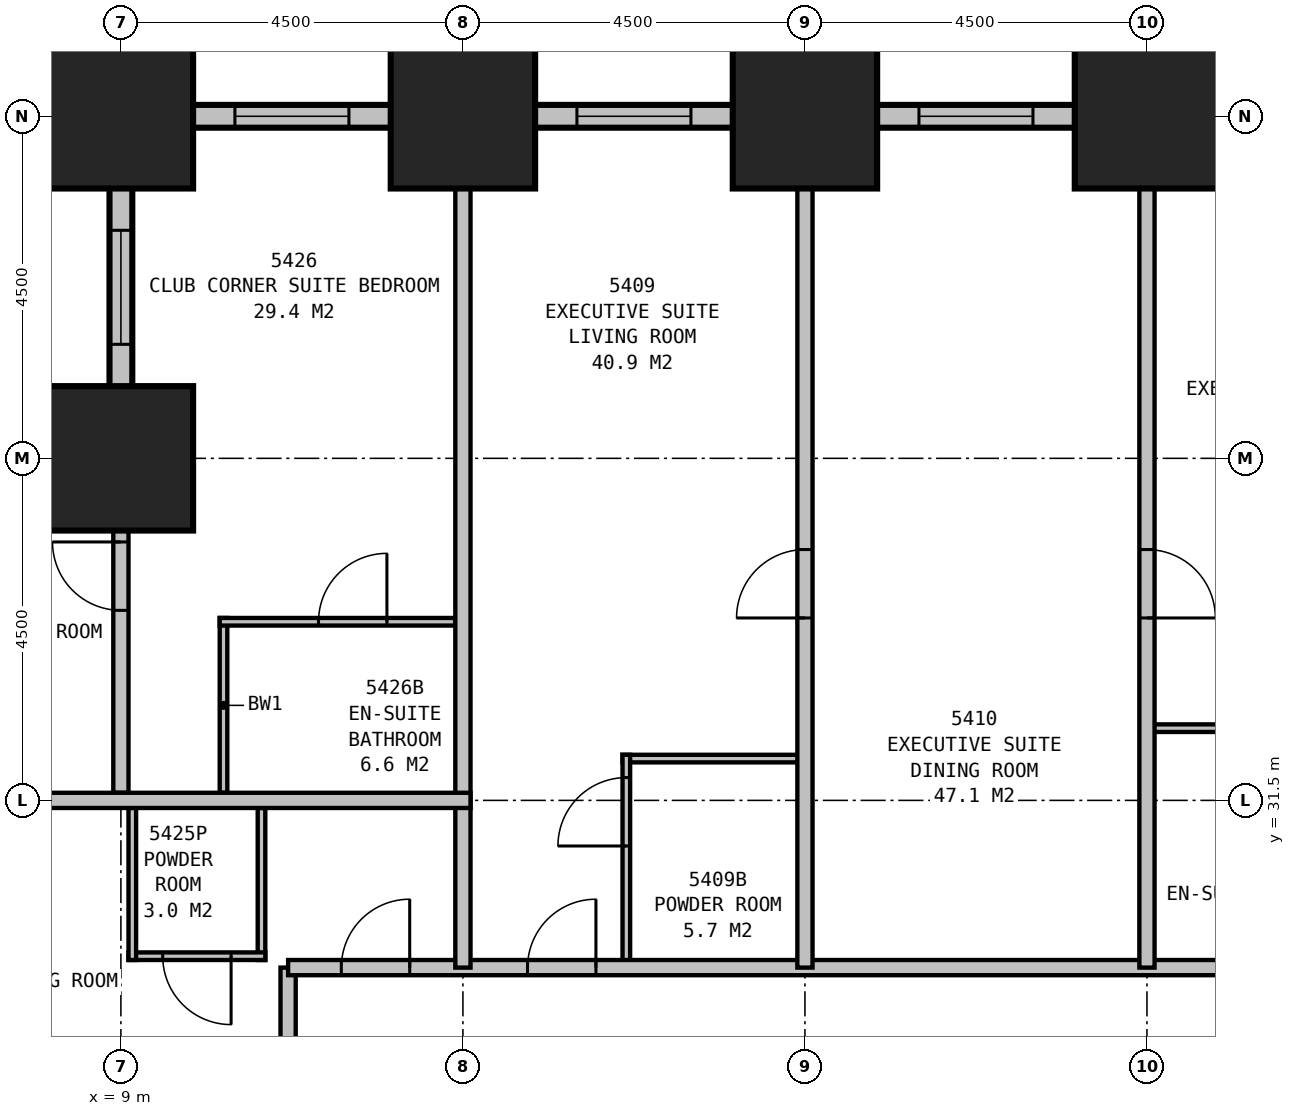
"""IFC4 building model, lengths in metres.
Left out: names, types, materials, properties, quantities, classifications, styles, units other than length and angle.
Written with IfcOpenShell. Run it as: python <this file> out.ifc"""

import sys

from ifc_helpers import new_model, si_unit, direction, frame, frame_2d, origin, origin_2d, place, context, subcontext, project, spatial, rectangle, extrude, element, fill, save


model = new_model("IFC4")
c1 = context("Model", 3, precision=1e-05, world=origin(), true_north=direction((0.0, 1.0)))
c2 = subcontext(c1, "Body", "Model", "MODEL_VIEW")
j1 = project(units=[si_unit("LENGTHUNIT", "METRE"), si_unit("PLANEANGLEUNIT", "RADIAN")], contexts=[c1])
p1 = place(None, origin())
s1 = spatial("IfcSite", under=j1, at=p1, CompositionType="ELEMENT")
p2 = place(p1, origin())
s2 = spatial("IfcBuilding", under=s1, at=p2, CompositionType="ELEMENT")
p3 = place(p2, frame((0.0, 0.0, 207.9)))
s3 = spatial("IfcBuildingStorey", under=s2, at=p3, CompositionType="ELEMENT", Elevation=207.9)
for number, where, z_axis, x_axis in (
    (1, (22.5, 40.5, 0.0), (0.0, 0.0, 1.0), (1.0, 0.0, 0.0)),
    (2, (18.0, 40.5, 0.0), (0.0, 0.0, 1.0), (1.0, 0.0, 0.0)),
    (3, (13.5, 40.5, 0.0), (0.0, 0.0, 1.0), (1.0, 0.0, 0.0)),
    (4, (9.0, 40.5, 0.0), (0.0, 0.0, 1.0), (1.0, 0.0, 0.0)),
    (5, (9.0, 36.0, 0.0), (0.0, 0.0, 1.0), (1.0, 0.0, 0.0)),
):
    element("IfcColumn", number, at=place(p3, frame(where, z_axis=z_axis, x_axis=x_axis)), inside=s3, PredefinedType="COLUMN", context=c2, shape_type="SweptSolid", body=[
        extrude(rectangle(XDim=1.9, YDim=1.9, at=origin_2d()), origin(), (0.0, 0.0, 1.0), 3.5),
    ])
p4 = place(p3, frame((40.65, 40.5, 0.0), z_axis=(0.0, 0.0, 1.0), x_axis=(-1.0, 0.0, 0.0)))
e6 = element("IfcWall", 6, at=p4, inside=s3, PredefinedType="STANDARD", context=c2, shape_type="SweptSolid", body=[
    extrude(rectangle(XDim=31.8, YDim=0.3, at=frame_2d((15.9, 0.0))), origin(), (0.0, 0.0, 1.0), 1.9),
])
p5 = place(p4, frame((1.65, 0.0, 0.5)))
e7 = element("IfcOpeningElement", 7, at=p5, cuts=e6, PredefinedType="OPENING", context=c2, shape_type="SweptSolid", body=[
    extrude(rectangle(XDim=1.5, YDim=1.2, at=frame_2d((0.75, 0.6))), frame((0.0, 0.16, 0.0), z_axis=(0.0, -1.0, 0.0), x_axis=(1.0, 0.0, 0.0)), (0.0, 0.0, 1.0), 0.32),
])
p6 = place(p4, frame((6.15, 0.0, 0.5)))
e8 = element("IfcOpeningElement", 8, at=p6, cuts=e6, PredefinedType="OPENING", context=c2, shape_type="SweptSolid", body=[
    extrude(rectangle(XDim=1.5, YDim=1.2, at=frame_2d((0.75, 0.6))), frame((0.0, 0.16, 0.0), z_axis=(0.0, -1.0, 0.0), x_axis=(1.0, 0.0, 0.0)), (0.0, 0.0, 1.0), 0.32),
])
p7 = place(p4, frame((10.65, 0.0, 0.5)))
e9 = element("IfcOpeningElement", 9, at=p7, cuts=e6, PredefinedType="OPENING", context=c2, shape_type="SweptSolid", body=[
    extrude(rectangle(XDim=1.5, YDim=1.2, at=frame_2d((0.75, 0.6))), frame((0.0, 0.16, 0.0), z_axis=(0.0, -1.0, 0.0), x_axis=(1.0, 0.0, 0.0)), (0.0, 0.0, 1.0), 0.32),
])
p8 = place(p4, frame((15.15, 0.0, 0.5)))
e10 = element("IfcOpeningElement", 10, at=p8, cuts=e6, PredefinedType="OPENING", context=c2, shape_type="SweptSolid", body=[
    extrude(rectangle(XDim=1.5, YDim=1.2, at=frame_2d((0.75, 0.6))), frame((0.0, 0.16, 0.0), z_axis=(0.0, -1.0, 0.0), x_axis=(1.0, 0.0, 0.0)), (0.0, 0.0, 1.0), 0.32),
])
p9 = place(p4, frame((19.65, 0.0, 0.5)))
e11 = element("IfcOpeningElement", 11, at=p9, cuts=e6, PredefinedType="OPENING", context=c2, shape_type="SweptSolid", body=[
    extrude(rectangle(XDim=1.5, YDim=1.2, at=frame_2d((0.75, 0.6))), frame((0.0, 0.16, 0.0), z_axis=(0.0, -1.0, 0.0), x_axis=(1.0, 0.0, 0.0)), (0.0, 0.0, 1.0), 0.32),
])
p10 = place(p4, frame((24.15, 0.0, 0.5)))
e12 = element("IfcOpeningElement", 12, at=p10, cuts=e6, PredefinedType="OPENING", context=c2, shape_type="SweptSolid", body=[
    extrude(rectangle(XDim=1.5, YDim=1.2, at=frame_2d((0.75, 0.6))), frame((0.0, 0.16, 0.0), z_axis=(0.0, -1.0, 0.0), x_axis=(1.0, 0.0, 0.0)), (0.0, 0.0, 1.0), 0.32),
])
p11 = place(p4, frame((28.65, 0.0, 0.5)))
e13 = element("IfcOpeningElement", 13, at=p11, cuts=e6, PredefinedType="OPENING", context=c2, shape_type="SweptSolid", body=[
    extrude(rectangle(XDim=1.5, YDim=1.2, at=frame_2d((0.75, 0.6))), frame((0.0, 0.16, 0.0), z_axis=(0.0, -1.0, 0.0), x_axis=(1.0, 0.0, 0.0)), (0.0, 0.0, 1.0), 0.32),
])
p12 = place(p3, frame((9.0, 40.65, 0.0), z_axis=(0.0, 0.0, 1.0), x_axis=(0.0, -1.0, 0.0)))
e14 = element("IfcWall", 14, at=p12, inside=s3, PredefinedType="STANDARD", context=c2, shape_type="SweptSolid", body=[
    extrude(rectangle(XDim=4.8, YDim=0.3, at=frame_2d((2.4, 0.0))), origin(), (0.0, 0.0, 1.0), 1.9),
])
p13 = place(p12, frame((1.65, 0.0, 0.5)))
e15 = element("IfcOpeningElement", 15, at=p13, cuts=e14, PredefinedType="OPENING", context=c2, shape_type="SweptSolid", body=[
    extrude(rectangle(XDim=1.5, YDim=1.2, at=frame_2d((0.75, 0.6))), frame((0.0, 0.16, 0.0), z_axis=(0.0, -1.0, 0.0), x_axis=(1.0, 0.0, 0.0)), (0.0, 0.0, 1.0), 0.32),
])
p14 = place(p3, frame((9.15, 36.0, 0.0), z_axis=(0.0, 0.0, 1.0), x_axis=(-1.0, 0.0, 0.0)))
e16 = element("IfcWall", 16, at=p14, inside=s3, PredefinedType="STANDARD", context=c2, shape_type="SweptSolid", body=[
    extrude(rectangle(XDim=5.3, YDim=0.3, at=frame_2d((2.65, 0.0))), origin(), (0.0, 0.0, 1.0), 1.9),
])
p15 = place(p14, frame((1.45, 0.0, 0.5)))
e17 = element("IfcOpeningElement", 17, at=p15, cuts=e16, PredefinedType="OPENING", context=c2, shape_type="SweptSolid", body=[
    extrude(rectangle(XDim=2.4, YDim=1.2, at=frame_2d((1.2, 0.6))), frame((0.0, 0.16, 0.0), z_axis=(0.0, -1.0, 0.0), x_axis=(1.0, 0.0, 0.0)), (0.0, 0.0, 1.0), 0.32),
])
p16 = place(p3, frame((11.2, 29.3, 0.0), z_axis=(0.0, 0.0, 1.0), x_axis=(1.0, 0.0, 0.0)))
e18 = element("IfcWall", 18, at=p16, inside=s3, PredefinedType="PARTITIONING", context=c2, shape_type="SweptSolid", body=[
    extrude(rectangle(XDim=27.1, YDim=0.2, at=frame_2d((13.55, 0.0))), origin(), (0.0, 0.0, 1.0), 3.25),
])
p17 = place(p16, frame((3.15, 0.0, 0.0)))
e19 = element("IfcOpeningElement", 19, at=p17, cuts=e18, PredefinedType="OPENING", context=c2, shape_type="SweptSolid", body=[
    extrude(rectangle(XDim=0.9, YDim=2.1, at=frame_2d((0.45, 1.05))), frame((0.0, 0.11, 0.0), z_axis=(0.0, -1.0, 0.0), x_axis=(1.0, 0.0, 0.0)), (0.0, 0.0, 1.0), 0.22),
])
p18 = place(p16, frame((16.65, 0.0, 0.0)))
e20 = element("IfcOpeningElement", 20, at=p18, cuts=e18, PredefinedType="OPENING", context=c2, shape_type="SweptSolid", body=[
    extrude(rectangle(XDim=0.9, YDim=2.1, at=frame_2d((0.45, 1.05))), frame((0.0, 0.11, 0.0), z_axis=(0.0, -1.0, 0.0), x_axis=(1.0, 0.0, 0.0)), (0.0, 0.0, 1.0), 0.22),
])
p19 = place(p16, frame((25.5, 0.0, 0.0)))
e21 = element("IfcOpeningElement", 21, at=p19, cuts=e18, PredefinedType="OPENING", context=c2, shape_type="SweptSolid", body=[
    extrude(rectangle(XDim=0.9, YDim=2.1, at=frame_2d((0.45, 1.05))), frame((0.0, 0.11, 0.0), z_axis=(0.0, -1.0, 0.0), x_axis=(1.0, 0.0, 0.0)), (0.0, 0.0, 1.0), 0.22),
])
p20 = place(p16, frame((0.7, 0.0, 0.0)))
e22 = element("IfcOpeningElement", 22, at=p20, cuts=e18, PredefinedType="OPENING", context=c2, shape_type="SweptSolid", body=[
    extrude(rectangle(XDim=0.9, YDim=2.1, at=frame_2d((0.45, 1.05))), frame((0.0, 0.11, 0.0), z_axis=(0.0, -1.0, 0.0), x_axis=(1.0, 0.0, 0.0)), (0.0, 0.0, 1.0), 0.22),
])
p21 = place(p3, frame((11.2, 10.6, 0.0), z_axis=(0.0, 0.0, 1.0), x_axis=(0.0, 1.0, 0.0)))
e23 = element("IfcWall", 23, at=p21, inside=s3, PredefinedType="PARTITIONING", context=c2, shape_type="SweptSolid", body=[
    extrude(rectangle(XDim=18.7, YDim=0.2, at=frame_2d((9.35, 0.0))), origin(), (0.0, 0.0, 1.0), 3.25),
])
p22 = place(p21, frame((4.6, 0.0, 0.0)))
e24 = element("IfcOpeningElement", 24, at=p22, cuts=e23, PredefinedType="OPENING", context=c2, shape_type="SweptSolid", body=[
    extrude(rectangle(XDim=1.0, YDim=2.1, at=frame_2d((0.5, 1.05))), frame((0.0, 0.11, 0.0), z_axis=(0.0, -1.0, 0.0), x_axis=(1.0, 0.0, 0.0)), (0.0, 0.0, 1.0), 0.22),
])
p23 = place(p21, frame((9.05, 0.0, 0.0)))
e25 = element("IfcOpeningElement", 25, at=p23, cuts=e23, PredefinedType="OPENING", context=c2, shape_type="SweptSolid", body=[
    extrude(rectangle(XDim=0.9, YDim=2.1, at=frame_2d((0.45, 1.05))), frame((0.0, 0.11, 0.0), z_axis=(0.0, -1.0, 0.0), x_axis=(1.0, 0.0, 0.0)), (0.0, 0.0, 1.0), 0.22),
])
p24 = place(p3, frame((18.0, 29.3, 0.0), z_axis=(0.0, 0.0, 1.0), x_axis=(0.0, 1.0, 0.0)))
e26 = element("IfcWall", 26, at=p24, inside=s3, PredefinedType="PARTITIONING", context=c2, shape_type="SweptSolid", body=[
    extrude(rectangle(XDim=11.2, YDim=0.2, at=frame_2d((5.6, 0.0))), origin(), (0.0, 0.0, 1.0), 2.2),
])
p25 = place(p24, frame((4.6, 0.0, 0.0)))
e27 = element("IfcOpeningElement", 27, at=p25, cuts=e26, PredefinedType="OPENING", context=c2, shape_type="SweptSolid", body=[
    extrude(rectangle(XDim=0.9, YDim=2.1, at=frame_2d((0.45, 1.05))), frame((0.0, 0.11, 0.0), z_axis=(0.0, -1.0, 0.0), x_axis=(1.0, 0.0, 0.0)), (0.0, 0.0, 1.0), 0.22),
])
p26 = place(p3, frame((22.5, 29.3, 0.0), z_axis=(0.0, 0.0, 1.0), x_axis=(0.0, 1.0, 0.0)))
e28 = element("IfcWall", 28, at=p26, inside=s3, PredefinedType="PARTITIONING", context=c2, shape_type="SweptSolid", body=[
    extrude(rectangle(XDim=11.2, YDim=0.2, at=frame_2d((5.6, 0.0))), origin(), (0.0, 0.0, 1.0), 2.2),
])
p27 = place(p26, frame((5.5, 0.0, 0.0), z_axis=(0.0, 0.0, 1.0), x_axis=(-1.0, 0.0, 0.0)))
e29 = element("IfcOpeningElement", 29, at=p27, cuts=e28, PredefinedType="OPENING", context=c2, shape_type="SweptSolid", body=[
    extrude(rectangle(XDim=0.9, YDim=2.1, at=frame_2d((0.45, 1.05))), frame((0.0, 0.11, 0.0), z_axis=(0.0, -1.0, 0.0), x_axis=(1.0, 0.0, 0.0)), (0.0, 0.0, 1.0), 0.22),
])
p28 = place(p3, frame((15.6, 32.05, 0.0), z_axis=(0.0, 0.0, 1.0), x_axis=(1.0, 0.0, 0.0)))
e30 = element("IfcWall", 30, at=p28, inside=s3, PredefinedType="PLUMBINGWALL", context=c2, shape_type="SweptSolid", body=[
    extrude(rectangle(XDim=2.4, YDim=0.1, at=frame_2d((1.2, 0.0))), origin(), (0.0, 0.0, 1.0), 3.25),
])
p29 = place(p3, frame((15.65, 29.3, 0.0), z_axis=(0.0, 0.0, 1.0), x_axis=(0.0, 1.0, 0.0)))
e31 = element("IfcWall", 31, at=p29, inside=s3, PredefinedType="PLUMBINGWALL", context=c2, shape_type="SweptSolid", body=[
    extrude(rectangle(XDim=2.8, YDim=0.1, at=frame_2d((1.4, 0.0))), origin(), (0.0, 0.0, 1.0), 3.25),
])
p30 = place(p29, frame((1.6, 0.0, 0.0)))
e32 = element("IfcOpeningElement", 32, at=p30, cuts=e31, PredefinedType="OPENING", context=c2, shape_type="SweptSolid", body=[
    extrude(rectangle(XDim=0.9, YDim=2.1, at=frame_2d((0.45, 1.05))), frame((0.0, 0.06, 0.0), z_axis=(0.0, -1.0, 0.0), x_axis=(1.0, 0.0, 0.0)), (0.0, 0.0, 1.0), 0.12),
])
p31 = place(p3, frame((22.5, 32.45, 0.0), z_axis=(0.0, 0.0, 1.0), x_axis=(1.0, 0.0, 0.0)))
e33 = element("IfcWall", 33, at=p31, inside=s3, PredefinedType="PLUMBINGWALL", context=c2, shape_type="SweptSolid", body=[
    extrude(rectangle(XDim=3.15, YDim=0.1, at=frame_2d((1.575, 0.0))), origin(), (0.0, 0.0, 1.0), 3.25),
])
p32 = place(p3, frame((13.5, 29.3, 0.0), z_axis=(0.0, 0.0, 1.0), x_axis=(0.0, 1.0, 0.0)))
e34 = element("IfcWall", 34, at=p32, inside=s3, PredefinedType="PARTITIONING", context=c2, shape_type="SweptSolid", body=[
    extrude(rectangle(XDim=11.2, YDim=0.2, at=frame_2d((5.6, 0.0))), origin(), (0.0, 0.0, 1.0), 2.2),
])
p33 = place(p3, frame((13.6, 31.5, 0.0), z_axis=(0.0, 0.0, 1.0), x_axis=(-1.0, 0.0, 0.0)))
e35 = element("IfcWall", 35, at=p33, inside=s3, PredefinedType="PARTITIONING", context=c2, shape_type="SweptSolid", body=[
    extrude(rectangle(XDim=10.099, YDim=0.2, at=frame_2d((5.05, 0.0))), origin(), (0.0, 0.0, 1.0), 3.25),
])
p34 = place(p33, frame((8.999, 0.0, 0.0), z_axis=(0.0, 0.0, 1.0), x_axis=(-1.0, 0.0, 0.0)))
e36 = element("IfcOpeningElement", 36, at=p34, cuts=e35, PredefinedType="OPENING", context=c2, shape_type="SweptSolid", body=[
    extrude(rectangle(XDim=0.9, YDim=2.1, at=frame_2d((0.45, 1.05))), frame((0.0, 0.11, 0.0), z_axis=(0.0, -1.0, 0.0), x_axis=(1.0, 0.0, 0.0)), (0.0, 0.0, 1.0), 0.22),
])
p35 = place(p3, frame((9.15, 31.4, 0.0), z_axis=(0.0, 0.0, 1.0), x_axis=(0.0, -1.0, 0.0)))
e37 = element("IfcWall", 37, at=p35, inside=s3, PredefinedType="PLUMBINGWALL", context=c2, shape_type="SweptSolid", body=[
    extrude(rectangle(XDim=2.0, YDim=0.1, at=frame_2d((1.0, 0.0))), origin(), (0.0, 0.0, 1.0), 2.2),
])
p36 = place(p3, frame((10.85, 31.4, 0.0), z_axis=(0.0, 0.0, 1.0), x_axis=(0.0, -1.0, 0.0)))
e38 = element("IfcWall", 38, at=p36, inside=s3, PredefinedType="PLUMBINGWALL", context=c2, shape_type="SweptSolid", body=[
    extrude(rectangle(XDim=2.0, YDim=0.1, at=frame_2d((1.0, 0.0))), origin(), (0.0, 0.0, 1.0), 3.25),
])
p37 = place(p3, frame((10.9, 29.45, 0.0), z_axis=(0.0, 0.0, 1.0), x_axis=(-1.0, 0.0, 0.0)))
e39 = element("IfcWall", 39, at=p37, inside=s3, PredefinedType="PLUMBINGWALL", context=c2, shape_type="SweptSolid", body=[
    extrude(rectangle(XDim=1.8, YDim=0.1, at=frame_2d((0.9, 0.0))), origin(), (0.0, 0.0, 1.0), 3.25),
])
p38 = place(p37, frame((0.45, 0.0, 0.0)))
e40 = element("IfcOpeningElement", 40, at=p38, cuts=e39, PredefinedType="OPENING", context=c2, shape_type="SweptSolid", body=[
    extrude(rectangle(XDim=0.9, YDim=2.1, at=frame_2d((0.45, 1.05))), frame((0.0, 0.06, 0.0), z_axis=(0.0, -1.0, 0.0), x_axis=(1.0, 0.0, 0.0)), (0.0, 0.0, 1.0), 0.12),
])
p39 = place(p3, frame((9.0, 31.6, 0.0), z_axis=(0.0, 0.0, 1.0), x_axis=(0.0, 1.0, 0.0)))
e41 = element("IfcWall", 41, at=p39, inside=s3, PredefinedType="PARTITIONING", context=c2, shape_type="SweptSolid", body=[
    extrude(rectangle(XDim=4.4, YDim=0.2, at=frame_2d((2.2, 0.0))), origin(), (0.0, 0.0, 1.0), 2.2),
])
p40 = place(p39, frame((2.4, 0.0, 0.0)))
e42 = element("IfcOpeningElement", 42, at=p40, cuts=e41, PredefinedType="OPENING", context=c2, shape_type="SweptSolid", body=[
    extrude(rectangle(XDim=0.9, YDim=2.1, at=frame_2d((0.45, 1.05))), frame((0.0, 0.11, 0.0), z_axis=(0.0, -1.0, 0.0), x_axis=(1.0, 0.0, 0.0)), (0.0, 0.0, 1.0), 0.22),
])
p41 = place(p3, frame((10.35, 31.6, 0.0), z_axis=(0.0, 0.0, 1.0), x_axis=(0.0, 1.0, 0.0)))
e43 = element("IfcWall", 43, at=p41, inside=s3, PredefinedType="PLUMBINGWALL", context=c2, shape_type="SweptSolid", body=[
    extrude(rectangle(XDim=2.3, YDim=0.1, at=frame_2d((1.15, 0.0))), origin(), (0.0, 0.0, 1.0), 3.25),
])
p42 = place(p3, frame((13.4, 33.85, 0.0), z_axis=(0.0, 0.0, 1.0), x_axis=(-1.0, 0.0, 0.0)))
e44 = element("IfcWall", 44, at=p42, inside=s3, PredefinedType="PLUMBINGWALL", context=c2, shape_type="SweptSolid", body=[
    extrude(rectangle(XDim=3.1, YDim=0.1, at=frame_2d((1.55, 0.0))), origin(), (0.0, 0.0, 1.0), 3.25),
])
p43 = place(p42, frame((1.8, 0.0, 0.0), z_axis=(0.0, 0.0, 1.0), x_axis=(-1.0, 0.0, 0.0)))
e45 = element("IfcOpeningElement", 45, at=p43, cuts=e44, PredefinedType="OPENING", context=c2, shape_type="SweptSolid", body=[
    extrude(rectangle(XDim=0.9, YDim=2.1, at=frame_2d((0.45, 1.05))), frame((0.0, 0.06, 0.0), z_axis=(0.0, -1.0, 0.0), x_axis=(1.0, 0.0, 0.0)), (0.0, 0.0, 1.0), 0.12),
])
p44 = place(p9, origin())
e46 = element("IfcWindow", 46, at=p44, inside=s3, PartitioningType="SINGLE_PANEL", PredefinedType="WINDOW", context=c2, shape_type="SweptSolid", body=[
    extrude(rectangle(XDim=1.5, YDim=1.2, at=frame_2d((0.75, 0.6))), frame((0.0, 0.03, 0.0), z_axis=(0.0, -1.0, 0.0), x_axis=(1.0, 0.0, 0.0)), (0.0, 0.0, 1.0), 0.06),
])
fill(e11, e46)
p45 = place(p10, origin())
e47 = element("IfcWindow", 47, at=p45, inside=s3, PartitioningType="SINGLE_PANEL", PredefinedType="WINDOW", context=c2, shape_type="SweptSolid", body=[
    extrude(rectangle(XDim=1.5, YDim=1.2, at=frame_2d((0.75, 0.6))), frame((0.0, 0.03, 0.0), z_axis=(0.0, -1.0, 0.0), x_axis=(1.0, 0.0, 0.0)), (0.0, 0.0, 1.0), 0.06),
])
fill(e12, e47)
p46 = place(p11, origin())
e48 = element("IfcWindow", 48, at=p46, inside=s3, PartitioningType="SINGLE_PANEL", PredefinedType="WINDOW", context=c2, shape_type="SweptSolid", body=[
    extrude(rectangle(XDim=1.5, YDim=1.2, at=frame_2d((0.75, 0.6))), frame((0.0, 0.03, 0.0), z_axis=(0.0, -1.0, 0.0), x_axis=(1.0, 0.0, 0.0)), (0.0, 0.0, 1.0), 0.06),
])
fill(e13, e48)
p47 = place(p13, origin())
e49 = element("IfcWindow", 49, at=p47, inside=s3, PartitioningType="SINGLE_PANEL", PredefinedType="WINDOW", context=c2, shape_type="SweptSolid", body=[
    extrude(rectangle(XDim=1.5, YDim=1.2, at=frame_2d((0.75, 0.6))), frame((0.0, 0.03, 0.0), z_axis=(0.0, -1.0, 0.0), x_axis=(1.0, 0.0, 0.0)), (0.0, 0.0, 1.0), 0.06),
])
fill(e15, e49)
p48 = place(p17, origin())
e50 = element("IfcDoor", 50, at=p48, inside=s3, OperationType="SINGLE_SWING_RIGHT", PredefinedType="DOOR", context=c2, shape_type="SweptSolid", body=[
    extrude(rectangle(XDim=0.9, YDim=2.1, at=frame_2d((0.45, 1.05))), frame((0.0, 0.025, 0.0), z_axis=(0.0, -1.0, 0.0), x_axis=(1.0, 0.0, 0.0)), (0.0, 0.0, 1.0), 0.05),
])
fill(e19, e50)
p49 = place(p20, origin())
e51 = element("IfcDoor", 51, at=p49, inside=s3, OperationType="SINGLE_SWING_RIGHT", PredefinedType="DOOR", context=c2, shape_type="SweptSolid", body=[
    extrude(rectangle(XDim=0.9, YDim=2.1, at=frame_2d((0.45, 1.05))), frame((0.0, 0.025, 0.0), z_axis=(0.0, -1.0, 0.0), x_axis=(1.0, 0.0, 0.0)), (0.0, 0.0, 1.0), 0.05),
])
fill(e22, e51)
p50 = place(p25, origin())
e52 = element("IfcDoor", 52, at=p50, inside=s3, OperationType="SINGLE_SWING_LEFT", PredefinedType="DOOR", context=c2, shape_type="SweptSolid", body=[
    extrude(rectangle(XDim=0.9, YDim=2.1, at=frame_2d((0.45, 1.05))), frame((0.0, 0.025, 0.0), z_axis=(0.0, -1.0, 0.0), x_axis=(1.0, 0.0, 0.0)), (0.0, 0.0, 1.0), 0.05),
])
fill(e27, e52)
p51 = place(p27, origin())
e53 = element("IfcDoor", 53, at=p51, inside=s3, OperationType="SINGLE_SWING_RIGHT", PredefinedType="DOOR", context=c2, shape_type="SweptSolid", body=[
    extrude(rectangle(XDim=0.9, YDim=2.1, at=frame_2d((0.45, 1.05))), frame((0.0, 0.025, 0.0), z_axis=(0.0, -1.0, 0.0), x_axis=(1.0, 0.0, 0.0)), (0.0, 0.0, 1.0), 0.05),
])
fill(e29, e53)
p52 = place(p30, origin())
e54 = element("IfcDoor", 54, at=p52, inside=s3, OperationType="SINGLE_SWING_LEFT", PredefinedType="DOOR", context=c2, shape_type="SweptSolid", body=[
    extrude(rectangle(XDim=0.9, YDim=2.1, at=frame_2d((0.45, 1.05))), frame((0.0, 0.025, 0.0), z_axis=(0.0, -1.0, 0.0), x_axis=(1.0, 0.0, 0.0)), (0.0, 0.0, 1.0), 0.05),
])
fill(e32, e54)
p53 = place(p38, origin())
e55 = element("IfcDoor", 55, at=p53, inside=s3, OperationType="SINGLE_SWING_LEFT", PredefinedType="DOOR", context=c2, shape_type="SweptSolid", body=[
    extrude(rectangle(XDim=0.9, YDim=2.1, at=frame_2d((0.45, 1.05))), frame((0.0, 0.025, 0.0), z_axis=(0.0, -1.0, 0.0), x_axis=(1.0, 0.0, 0.0)), (0.0, 0.0, 1.0), 0.05),
])
fill(e40, e55)
p54 = place(p40, origin())
e56 = element("IfcDoor", 56, at=p54, inside=s3, OperationType="SINGLE_SWING_RIGHT", PredefinedType="DOOR", context=c2, shape_type="SweptSolid", body=[
    extrude(rectangle(XDim=0.9, YDim=2.1, at=frame_2d((0.45, 1.05))), frame((0.0, 0.025, 0.0), z_axis=(0.0, -1.0, 0.0), x_axis=(1.0, 0.0, 0.0)), (0.0, 0.0, 1.0), 0.05),
])
fill(e42, e56)
p55 = place(p43, origin())
e57 = element("IfcDoor", 57, at=p55, inside=s3, OperationType="SINGLE_SWING_RIGHT", PredefinedType="DOOR", context=c2, shape_type="SweptSolid", body=[
    extrude(rectangle(XDim=0.9, YDim=2.1, at=frame_2d((0.45, 1.05))), frame((0.0, 0.025, 0.0), z_axis=(0.0, -1.0, 0.0), x_axis=(1.0, 0.0, 0.0)), (0.0, 0.0, 1.0), 0.05),
])
fill(e45, e57)
save(model, sys.argv[1])
